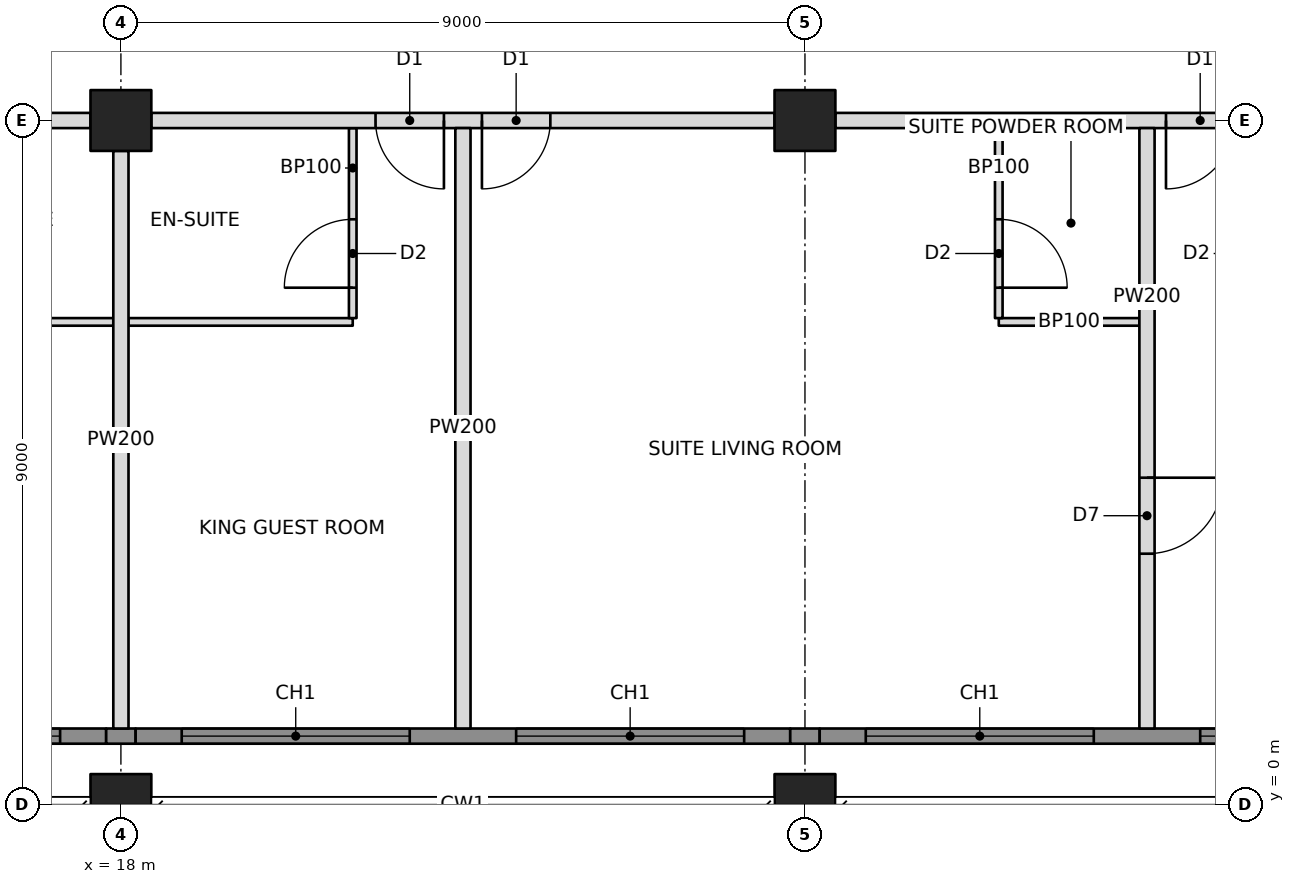
"""IFC4 building model, lengths in metres.
Left out: names, types, materials, properties, quantities, classifications, styles, units other than length and angle.
Written with IfcOpenShell. Run it as: python <this file> out.ifc"""

import sys

from ifc_helpers import new_model, si_unit, direction, frame, frame_2d, origin, origin_2d, place, context, subcontext, project, spatial, rectangle, hollow_rectangle, extrude, element, fill, save


model = new_model("IFC4")
c1 = context("Model", 3, precision=1e-05, world=origin(), true_north=direction((0.0, 1.0)))
c2 = subcontext(c1, "Body", "Model", "MODEL_VIEW")
j1 = project(units=[si_unit("LENGTHUNIT", "METRE"), si_unit("PLANEANGLEUNIT", "RADIAN")], contexts=[c1])
p1 = place(None, origin())
s1 = spatial("IfcSite", under=j1, at=p1, CompositionType="ELEMENT")
p2 = place(p1, origin())
s2 = spatial("IfcBuilding", under=s1, at=p2, CompositionType="ELEMENT")
p3 = place(p2, frame((0.0, 0.0, 148.6)))
s3 = spatial("IfcBuildingStorey", under=s2, at=p3, CompositionType="ELEMENT", Elevation=148.6)
p4 = place(p3, frame((18.0, 0.0, 0.0), z_axis=(0.0, 0.0, 1.0), x_axis=(1.0, 0.0, 0.0)))
e1 = element("IfcColumn", 1, at=p4, inside=s3, PredefinedType="COLUMN", context=c2, shape_type="SweptSolid", body=[
    extrude(hollow_rectangle(XDim=0.8, YDim=0.8, WallThickness=0.06, at=origin_2d()), origin(), (0.0, 0.0, 1.0), 3.4),
])
p5 = place(p3, frame((18.0, 9.0, 0.0), z_axis=(0.0, 0.0, 1.0), x_axis=(1.0, 0.0, 0.0)))
e2 = element("IfcColumn", 2, at=p5, inside=s3, PredefinedType="COLUMN", context=c2, shape_type="SweptSolid", body=[
    extrude(hollow_rectangle(XDim=0.8, YDim=0.8, WallThickness=0.07, at=origin_2d()), origin(), (0.0, 0.0, 1.0), 3.4),
])
p6 = place(p3, frame((27.0, 0.0, 0.0), z_axis=(0.0, 0.0, 1.0), x_axis=(1.0, 0.0, 0.0)))
e3 = element("IfcColumn", 3, at=p6, inside=s3, PredefinedType="COLUMN", context=c2, shape_type="SweptSolid", body=[
    extrude(hollow_rectangle(XDim=0.8, YDim=0.8, WallThickness=0.06, at=origin_2d()), origin(), (0.0, 0.0, 1.0), 3.4),
])
p7 = place(p3, frame((27.0, 9.0, 0.0), z_axis=(0.0, 0.0, 1.0), x_axis=(1.0, 0.0, 0.0)))
e4 = element("IfcColumn", 4, at=p7, inside=s3, PredefinedType="COLUMN", context=c2, shape_type="SweptSolid", body=[
    extrude(hollow_rectangle(XDim=0.8, YDim=0.8, WallThickness=0.07, at=origin_2d()), origin(), (0.0, 0.0, 1.0), 3.4),
])
p8 = place(p3, frame((9.4, 9.0, 0.0), z_axis=(0.0, 0.0, 1.0), x_axis=(1.0, 0.0, 0.0)))
e5 = element("IfcWall", 5, at=p8, inside=s3, PredefinedType="PARTITIONING", context=c2, shape_type="SweptSolid", body=[
    extrude(rectangle(XDim=8.2, YDim=0.2, at=frame_2d((4.1, 0.0))), origin(), (0.0, 0.0, 1.0), 2.405),
])
p9 = place(p8, frame((0.15, 0.0, 0.0)))
e6 = element("IfcOpeningElement", 6, at=p9, cuts=e5, PredefinedType="OPENING", context=c2, shape_type="SweptSolid", body=[
    extrude(rectangle(XDim=0.9, YDim=2.1, at=frame_2d((0.45, 1.05))), frame((0.0, 0.11, 0.0), z_axis=(0.0, -1.0, 0.0), x_axis=(1.0, 0.0, 0.0)), (0.0, 0.0, 1.0), 0.22),
])
p10 = place(p3, frame((18.4, 9.0, 0.0), z_axis=(0.0, 0.0, 1.0), x_axis=(1.0, 0.0, 0.0)))
e7 = element("IfcWall", 7, at=p10, inside=s3, PredefinedType="PARTITIONING", context=c2, shape_type="SweptSolid", body=[
    extrude(rectangle(XDim=8.2, YDim=0.2, at=frame_2d((4.1, 0.0))), origin(), (0.0, 0.0, 1.0), 2.405),
])
p11 = place(p10, frame((2.95, 0.0, 0.0)))
e8 = element("IfcOpeningElement", 8, at=p11, cuts=e7, PredefinedType="OPENING", context=c2, shape_type="SweptSolid", body=[
    extrude(rectangle(XDim=0.9, YDim=2.1, at=frame_2d((0.45, 1.05))), frame((0.0, 0.11, 0.0), z_axis=(0.0, -1.0, 0.0), x_axis=(1.0, 0.0, 0.0)), (0.0, 0.0, 1.0), 0.22),
])
p12 = place(p10, frame((4.35, 0.0, 0.0)))
e9 = element("IfcOpeningElement", 9, at=p12, cuts=e7, PredefinedType="OPENING", context=c2, shape_type="SweptSolid", body=[
    extrude(rectangle(XDim=0.9, YDim=2.1, at=frame_2d((0.45, 1.05))), frame((0.0, 0.11, 0.0), z_axis=(0.0, -1.0, 0.0), x_axis=(1.0, 0.0, 0.0)), (0.0, 0.0, 1.0), 0.22),
])
p13 = place(p3, frame((27.4, 9.0, 0.0), z_axis=(0.0, 0.0, 1.0), x_axis=(1.0, 0.0, 0.0)))
e10 = element("IfcWall", 10, at=p13, inside=s3, PredefinedType="PARTITIONING", context=c2, shape_type="SweptSolid", body=[
    extrude(rectangle(XDim=8.2, YDim=0.2, at=frame_2d((4.1, 0.0))), origin(), (0.0, 0.0, 1.0), 2.405),
])
p14 = place(p13, frame((4.35, 0.0, 0.0)))
e11 = element("IfcOpeningElement", 11, at=p14, cuts=e10, PredefinedType="OPENING", context=c2, shape_type="SweptSolid", body=[
    extrude(rectangle(XDim=0.9, YDim=2.1, at=frame_2d((0.45, 1.05))), frame((0.0, 0.11, 0.0), z_axis=(0.0, -1.0, 0.0), x_axis=(1.0, 0.0, 0.0)), (0.0, 0.0, 1.0), 0.22),
])
p15 = place(p3, frame((18.0, 8.6, 0.0), z_axis=(0.0, 0.0, 1.0), x_axis=(0.0, -1.0, 0.0)))
e12 = element("IfcWall", 12, at=p15, inside=s3, PredefinedType="PARTITIONING", context=c2, shape_type="SweptSolid", body=[
    extrude(rectangle(XDim=7.6, YDim=0.2, at=frame_2d((3.8, 0.0))), origin(), (0.0, 0.0, 1.0), 2.405),
])
p16 = place(p3, frame((22.5, 8.9, 0.0), z_axis=(0.0, 0.0, 1.0), x_axis=(0.0, -1.0, 0.0)))
e13 = element("IfcWall", 13, at=p16, inside=s3, PredefinedType="PARTITIONING", context=c2, shape_type="SweptSolid", body=[
    extrude(rectangle(XDim=7.9, YDim=0.2, at=frame_2d((3.95, 0.0))), origin(), (0.0, 0.0, 1.0), 2.404),
])
p17 = place(p3, frame((31.5, 8.9, 0.0), z_axis=(0.0, 0.0, 1.0), x_axis=(0.0, -1.0, 0.0)))
e14 = element("IfcWall", 14, at=p17, inside=s3, PredefinedType="PARTITIONING", context=c2, shape_type="SweptSolid", body=[
    extrude(rectangle(XDim=7.9, YDim=0.2, at=frame_2d((3.95, 0.0))), origin(), (0.0, 0.0, 1.0), 2.404),
])
p18 = place(p17, frame((4.6, 0.0, 0.0)))
e15 = element("IfcOpeningElement", 15, at=p18, cuts=e14, PredefinedType="OPENING", context=c2, shape_type="SweptSolid", body=[
    extrude(rectangle(XDim=1.0, YDim=2.1, at=frame_2d((0.5, 1.05))), frame((0.0, 0.11, 0.0), z_axis=(0.0, -1.0, 0.0), x_axis=(1.0, 0.0, 0.0)), (0.0, 0.0, 1.0), 0.22),
])
p19 = place(p3, frame((14.45, 6.35, 0.0), z_axis=(0.0, 0.0, 1.0), x_axis=(1.0, 0.0, 0.0)))
e16 = element("IfcWall", 16, at=p19, inside=s3, PredefinedType="PARTITIONING", context=c2, shape_type="SweptSolid", body=[
    extrude(rectangle(XDim=3.45, YDim=0.1, at=frame_2d((1.725, 0.0))), origin(), (0.0, 0.0, 1.0), 2.404),
])
p20 = place(p3, frame((18.1, 6.35, 0.0), z_axis=(0.0, 0.0, 1.0), x_axis=(1.0, 0.0, 0.0)))
e17 = element("IfcWall", 17, at=p20, inside=s3, PredefinedType="PARTITIONING", context=c2, shape_type="SweptSolid", body=[
    extrude(rectangle(XDim=2.95, YDim=0.1, at=frame_2d((1.475, 0.0))), origin(), (0.0, 0.0, 1.0), 2.404),
])
p21 = place(p3, frame((21.05, 8.9, 0.0), z_axis=(0.0, 0.0, 1.0), x_axis=(0.0, -1.0, 0.0)))
e18 = element("IfcWall", 18, at=p21, inside=s3, PredefinedType="PARTITIONING", context=c2, shape_type="SweptSolid", body=[
    extrude(rectangle(XDim=2.5, YDim=0.1, at=frame_2d((1.25, 0.0))), origin(), (0.0, 0.0, 1.0), 2.404),
])
p22 = place(p21, frame((1.2, 0.0, 0.0)))
e19 = element("IfcOpeningElement", 19, at=p22, cuts=e18, PredefinedType="OPENING", context=c2, shape_type="SweptSolid", body=[
    extrude(rectangle(XDim=0.9, YDim=2.1, at=frame_2d((0.45, 1.05))), frame((0.0, 0.06, 0.0), z_axis=(0.0, -1.0, 0.0), x_axis=(1.0, 0.0, 0.0)), (0.0, 0.0, 1.0), 0.12),
])
p23 = place(p3, frame((29.55, 6.35, 0.0), z_axis=(0.0, 0.0, 1.0), x_axis=(1.0, 0.0, 0.0)))
e20 = element("IfcWall", 20, at=p23, inside=s3, PredefinedType="PARTITIONING", context=c2, shape_type="SweptSolid", body=[
    extrude(rectangle(XDim=1.85, YDim=0.1, at=frame_2d((0.925, 0.0))), origin(), (0.0, 0.0, 1.0), 3.2),
])
p24 = place(p3, frame((29.55, 8.9, 0.0), z_axis=(0.0, 0.0, 1.0), x_axis=(0.0, -1.0, 0.0)))
e21 = element("IfcWall", 21, at=p24, inside=s3, PredefinedType="PARTITIONING", context=c2, shape_type="SweptSolid", body=[
    extrude(rectangle(XDim=2.5, YDim=0.1, at=frame_2d((1.25, 0.0))), origin(), (0.0, 0.0, 1.0), 2.404),
])
p25 = place(p24, frame((1.2, 0.0, 0.0)))
e22 = element("IfcOpeningElement", 22, at=p25, cuts=e21, PredefinedType="OPENING", context=c2, shape_type="SweptSolid", body=[
    extrude(rectangle(XDim=0.9, YDim=2.1, at=frame_2d((0.45, 1.05))), frame((0.0, 0.06, 0.0), z_axis=(0.0, -1.0, 0.0), x_axis=(1.0, 0.0, 0.0)), (0.0, 0.0, 1.0), 0.12),
])
p26 = place(p3, frame((9.135, 0.9, 0.0), z_axis=(0.0, 0.0, 1.0), x_axis=(1.0, 0.0, 0.0)))
e23 = element("IfcWall", 23, at=p26, inside=s3, PredefinedType="SOLIDWALL", context=c2, shape_type="SweptSolid", body=[
    extrude(rectangle(XDim=8.671, YDim=0.2, at=frame_2d((4.335, 0.0))), origin(), (0.0, 0.0, 1.0), 3.2),
])
p27 = place(p26, frame((0.665, 0.0, 0.6)))
e24 = element("IfcOpeningElement", 24, at=p27, cuts=e23, PredefinedType="OPENING", context=c2, shape_type="SweptSolid", body=[
    extrude(rectangle(XDim=3.0, YDim=2.2, at=frame_2d((1.5, 1.1))), frame((0.0, 0.11, 0.0), z_axis=(0.0, -1.0, 0.0), x_axis=(1.0, 0.0, 0.0)), (0.0, 0.0, 1.0), 0.22),
])
p28 = place(p26, frame((5.065, 0.0, 0.6)))
e25 = element("IfcOpeningElement", 25, at=p28, cuts=e23, PredefinedType="OPENING", context=c2, shape_type="SweptSolid", body=[
    extrude(rectangle(XDim=3.0, YDim=2.2, at=frame_2d((1.5, 1.1))), frame((0.0, 0.11, 0.0), z_axis=(0.0, -1.0, 0.0), x_axis=(1.0, 0.0, 0.0)), (0.0, 0.0, 1.0), 0.22),
])
p29 = place(p3, frame((17.806, 0.9, 0.0), z_axis=(0.0, 0.0, 1.0), x_axis=(1.0, 0.0, 0.0)))
e26 = element("IfcWall", 26, at=p29, inside=s3, PredefinedType="SOLIDWALL", context=c2, shape_type="SweptSolid", body=[
    extrude(rectangle(XDim=0.388, YDim=0.2, at=frame_2d((0.194, 0.0))), origin(), (0.0, 0.0, 1.0), 2.404),
])
p30 = place(p3, frame((18.194, 0.9, 0.0), z_axis=(0.0, 0.0, 1.0), x_axis=(1.0, 0.0, 0.0)))
e27 = element("IfcWall", 27, at=p30, inside=s3, PredefinedType="SOLIDWALL", context=c2, shape_type="SweptSolid", body=[
    extrude(rectangle(XDim=8.612, YDim=0.2, at=frame_2d((4.306, 0.0))), origin(), (0.0, 0.0, 1.0), 3.2),
])
p31 = place(p30, frame((0.606, 0.0, 0.6)))
e28 = element("IfcOpeningElement", 28, at=p31, cuts=e27, PredefinedType="OPENING", context=c2, shape_type="SweptSolid", body=[
    extrude(rectangle(XDim=3.0, YDim=2.2, at=frame_2d((1.5, 1.1))), frame((0.0, 0.11, 0.0), z_axis=(0.0, -1.0, 0.0), x_axis=(1.0, 0.0, 0.0)), (0.0, 0.0, 1.0), 0.22),
])
p32 = place(p30, frame((5.006, 0.0, 0.6)))
e29 = element("IfcOpeningElement", 29, at=p32, cuts=e27, PredefinedType="OPENING", context=c2, shape_type="SweptSolid", body=[
    extrude(rectangle(XDim=3.0, YDim=2.2, at=frame_2d((1.5, 1.1))), frame((0.0, 0.11, 0.0), z_axis=(0.0, -1.0, 0.0), x_axis=(1.0, 0.0, 0.0)), (0.0, 0.0, 1.0), 0.22),
])
p33 = place(p3, frame((26.806, 0.9, 0.0), z_axis=(0.0, 0.0, 1.0), x_axis=(1.0, 0.0, 0.0)))
e30 = element("IfcWall", 30, at=p33, inside=s3, PredefinedType="SOLIDWALL", context=c2, shape_type="SweptSolid", body=[
    extrude(rectangle(XDim=0.388, YDim=0.2, at=frame_2d((0.194, 0.0))), origin(), (0.0, 0.0, 1.0), 2.404),
])
p34 = place(p3, frame((27.194, 0.9, 0.0), z_axis=(0.0, 0.0, 1.0), x_axis=(1.0, 0.0, 0.0)))
e31 = element("IfcWall", 31, at=p34, inside=s3, PredefinedType="SOLIDWALL", context=c2, shape_type="SweptSolid", body=[
    extrude(rectangle(XDim=8.671, YDim=0.2, at=frame_2d((4.335, 0.0))), origin(), (0.0, 0.0, 1.0), 3.2),
])
p35 = place(p34, frame((0.606, 0.0, 0.6)))
e32 = element("IfcOpeningElement", 32, at=p35, cuts=e31, PredefinedType="OPENING", context=c2, shape_type="SweptSolid", body=[
    extrude(rectangle(XDim=3.0, YDim=2.2, at=frame_2d((1.5, 1.1))), frame((0.0, 0.11, 0.0), z_axis=(0.0, -1.0, 0.0), x_axis=(1.0, 0.0, 0.0)), (0.0, 0.0, 1.0), 0.22),
])
p36 = place(p34, frame((5.006, 0.0, 0.6)))
e33 = element("IfcOpeningElement", 33, at=p36, cuts=e31, PredefinedType="OPENING", context=c2, shape_type="SweptSolid", body=[
    extrude(rectangle(XDim=3.0, YDim=2.2, at=frame_2d((1.5, 1.1))), frame((0.0, 0.11, 0.0), z_axis=(0.0, -1.0, 0.0), x_axis=(1.0, 0.0, 0.0)), (0.0, 0.0, 1.0), 0.22),
])
p37 = place(p28, origin())
e34 = element("IfcWindow", 34, at=p37, inside=s3, PartitioningType="TRIPLE_PANEL_VERTICAL", PredefinedType="WINDOW", context=c2, shape_type="SweptSolid", body=[
    extrude(rectangle(XDim=3.0, YDim=2.2, at=frame_2d((1.5, 1.1))), frame((0.0, 0.03, 0.0), z_axis=(0.0, -1.0, 0.0), x_axis=(1.0, 0.0, 0.0)), (0.0, 0.0, 1.0), 0.06),
])
fill(e25, e34)
p38 = place(p31, origin())
e35 = element("IfcWindow", 35, at=p38, inside=s3, PartitioningType="TRIPLE_PANEL_VERTICAL", PredefinedType="WINDOW", context=c2, shape_type="SweptSolid", body=[
    extrude(rectangle(XDim=3.0, YDim=2.2, at=frame_2d((1.5, 1.1))), frame((0.0, 0.03, 0.0), z_axis=(0.0, -1.0, 0.0), x_axis=(1.0, 0.0, 0.0)), (0.0, 0.0, 1.0), 0.06),
])
fill(e28, e35)
p39 = place(p32, origin())
e36 = element("IfcWindow", 36, at=p39, inside=s3, PartitioningType="TRIPLE_PANEL_VERTICAL", PredefinedType="WINDOW", context=c2, shape_type="SweptSolid", body=[
    extrude(rectangle(XDim=3.0, YDim=2.2, at=frame_2d((1.5, 1.1))), frame((0.0, 0.03, 0.0), z_axis=(0.0, -1.0, 0.0), x_axis=(1.0, 0.0, 0.0)), (0.0, 0.0, 1.0), 0.06),
])
fill(e29, e36)
p40 = place(p35, origin())
e37 = element("IfcWindow", 37, at=p40, inside=s3, PartitioningType="TRIPLE_PANEL_VERTICAL", PredefinedType="WINDOW", context=c2, shape_type="SweptSolid", body=[
    extrude(rectangle(XDim=3.0, YDim=2.2, at=frame_2d((1.5, 1.1))), frame((0.0, 0.03, 0.0), z_axis=(0.0, -1.0, 0.0), x_axis=(1.0, 0.0, 0.0)), (0.0, 0.0, 1.0), 0.06),
])
fill(e32, e37)
p41 = place(p36, origin())
e38 = element("IfcWindow", 38, at=p41, inside=s3, PartitioningType="TRIPLE_PANEL_VERTICAL", PredefinedType="WINDOW", context=c2, shape_type="SweptSolid", body=[
    extrude(rectangle(XDim=3.0, YDim=2.2, at=frame_2d((1.5, 1.1))), frame((0.0, 0.03, 0.0), z_axis=(0.0, -1.0, 0.0), x_axis=(1.0, 0.0, 0.0)), (0.0, 0.0, 1.0), 0.06),
])
fill(e33, e38)
p42 = place(p18, origin())
e39 = element("IfcDoor", 39, at=p42, inside=s3, OperationType="SINGLE_SWING_LEFT", PredefinedType="DOOR", context=c2, shape_type="SweptSolid", body=[
    extrude(rectangle(XDim=1.0, YDim=2.1, at=frame_2d((0.5, 1.05))), frame((0.0, 0.025, 0.0), z_axis=(0.0, -1.0, 0.0), x_axis=(1.0, 0.0, 0.0)), (0.0, 0.0, 1.0), 0.05),
])
fill(e15, e39)
p43 = place(p22, frame((0.9, 0.0, 0.0), z_axis=(0.0, 0.0, 1.0), x_axis=(-1.0, 0.0, 0.0)))
e40 = element("IfcDoor", 40, at=p43, inside=s3, OperationType="SINGLE_SWING_LEFT", PredefinedType="DOOR", context=c2, shape_type="SweptSolid", body=[
    extrude(rectangle(XDim=0.9, YDim=2.1, at=frame_2d((0.45, 1.05))), frame((0.0, 0.025, 0.0), z_axis=(0.0, -1.0, 0.0), x_axis=(1.0, 0.0, 0.0)), (0.0, 0.0, 1.0), 0.05),
])
fill(e19, e40)
p44 = place(p11, frame((0.9, 0.0, 0.0), z_axis=(0.0, 0.0, 1.0), x_axis=(-1.0, 0.0, 0.0)))
e41 = element("IfcDoor", 41, at=p44, inside=s3, OperationType="SINGLE_SWING_LEFT", PredefinedType="DOOR", context=c2, shape_type="SweptSolid", body=[
    extrude(rectangle(XDim=0.9, YDim=2.1, at=frame_2d((0.45, 1.05))), frame((0.0, 0.025, 0.0), z_axis=(0.0, -1.0, 0.0), x_axis=(1.0, 0.0, 0.0)), (0.0, 0.0, 1.0), 0.05),
])
fill(e8, e41)
p45 = place(p25, origin())
e42 = element("IfcDoor", 42, at=p45, inside=s3, OperationType="SINGLE_SWING_RIGHT", PredefinedType="DOOR", context=c2, shape_type="SweptSolid", body=[
    extrude(rectangle(XDim=0.9, YDim=2.1, at=frame_2d((0.45, 1.05))), frame((0.0, 0.025, 0.0), z_axis=(0.0, -1.0, 0.0), x_axis=(1.0, 0.0, 0.0)), (0.0, 0.0, 1.0), 0.05),
])
fill(e22, e42)
p46 = place(p12, frame((0.9, 0.0, 0.0), z_axis=(0.0, 0.0, 1.0), x_axis=(-1.0, 0.0, 0.0)))
e43 = element("IfcDoor", 43, at=p46, inside=s3, OperationType="SINGLE_SWING_RIGHT", PredefinedType="DOOR", context=c2, shape_type="SweptSolid", body=[
    extrude(rectangle(XDim=0.9, YDim=2.1, at=frame_2d((0.45, 1.05))), frame((0.0, 0.025, 0.0), z_axis=(0.0, -1.0, 0.0), x_axis=(1.0, 0.0, 0.0)), (0.0, 0.0, 1.0), 0.05),
])
fill(e9, e43)
p47 = place(p14, frame((0.9, 0.0, 0.0), z_axis=(0.0, 0.0, 1.0), x_axis=(-1.0, 0.0, 0.0)))
e44 = element("IfcDoor", 44, at=p47, inside=s3, OperationType="SINGLE_SWING_RIGHT", PredefinedType="DOOR", context=c2, shape_type="SweptSolid", body=[
    extrude(rectangle(XDim=0.9, YDim=2.1, at=frame_2d((0.45, 1.05))), frame((0.0, 0.025, 0.0), z_axis=(0.0, -1.0, 0.0), x_axis=(1.0, 0.0, 0.0)), (0.0, 0.0, 1.0), 0.05),
])
fill(e11, e44)
save(model, sys.argv[1])
